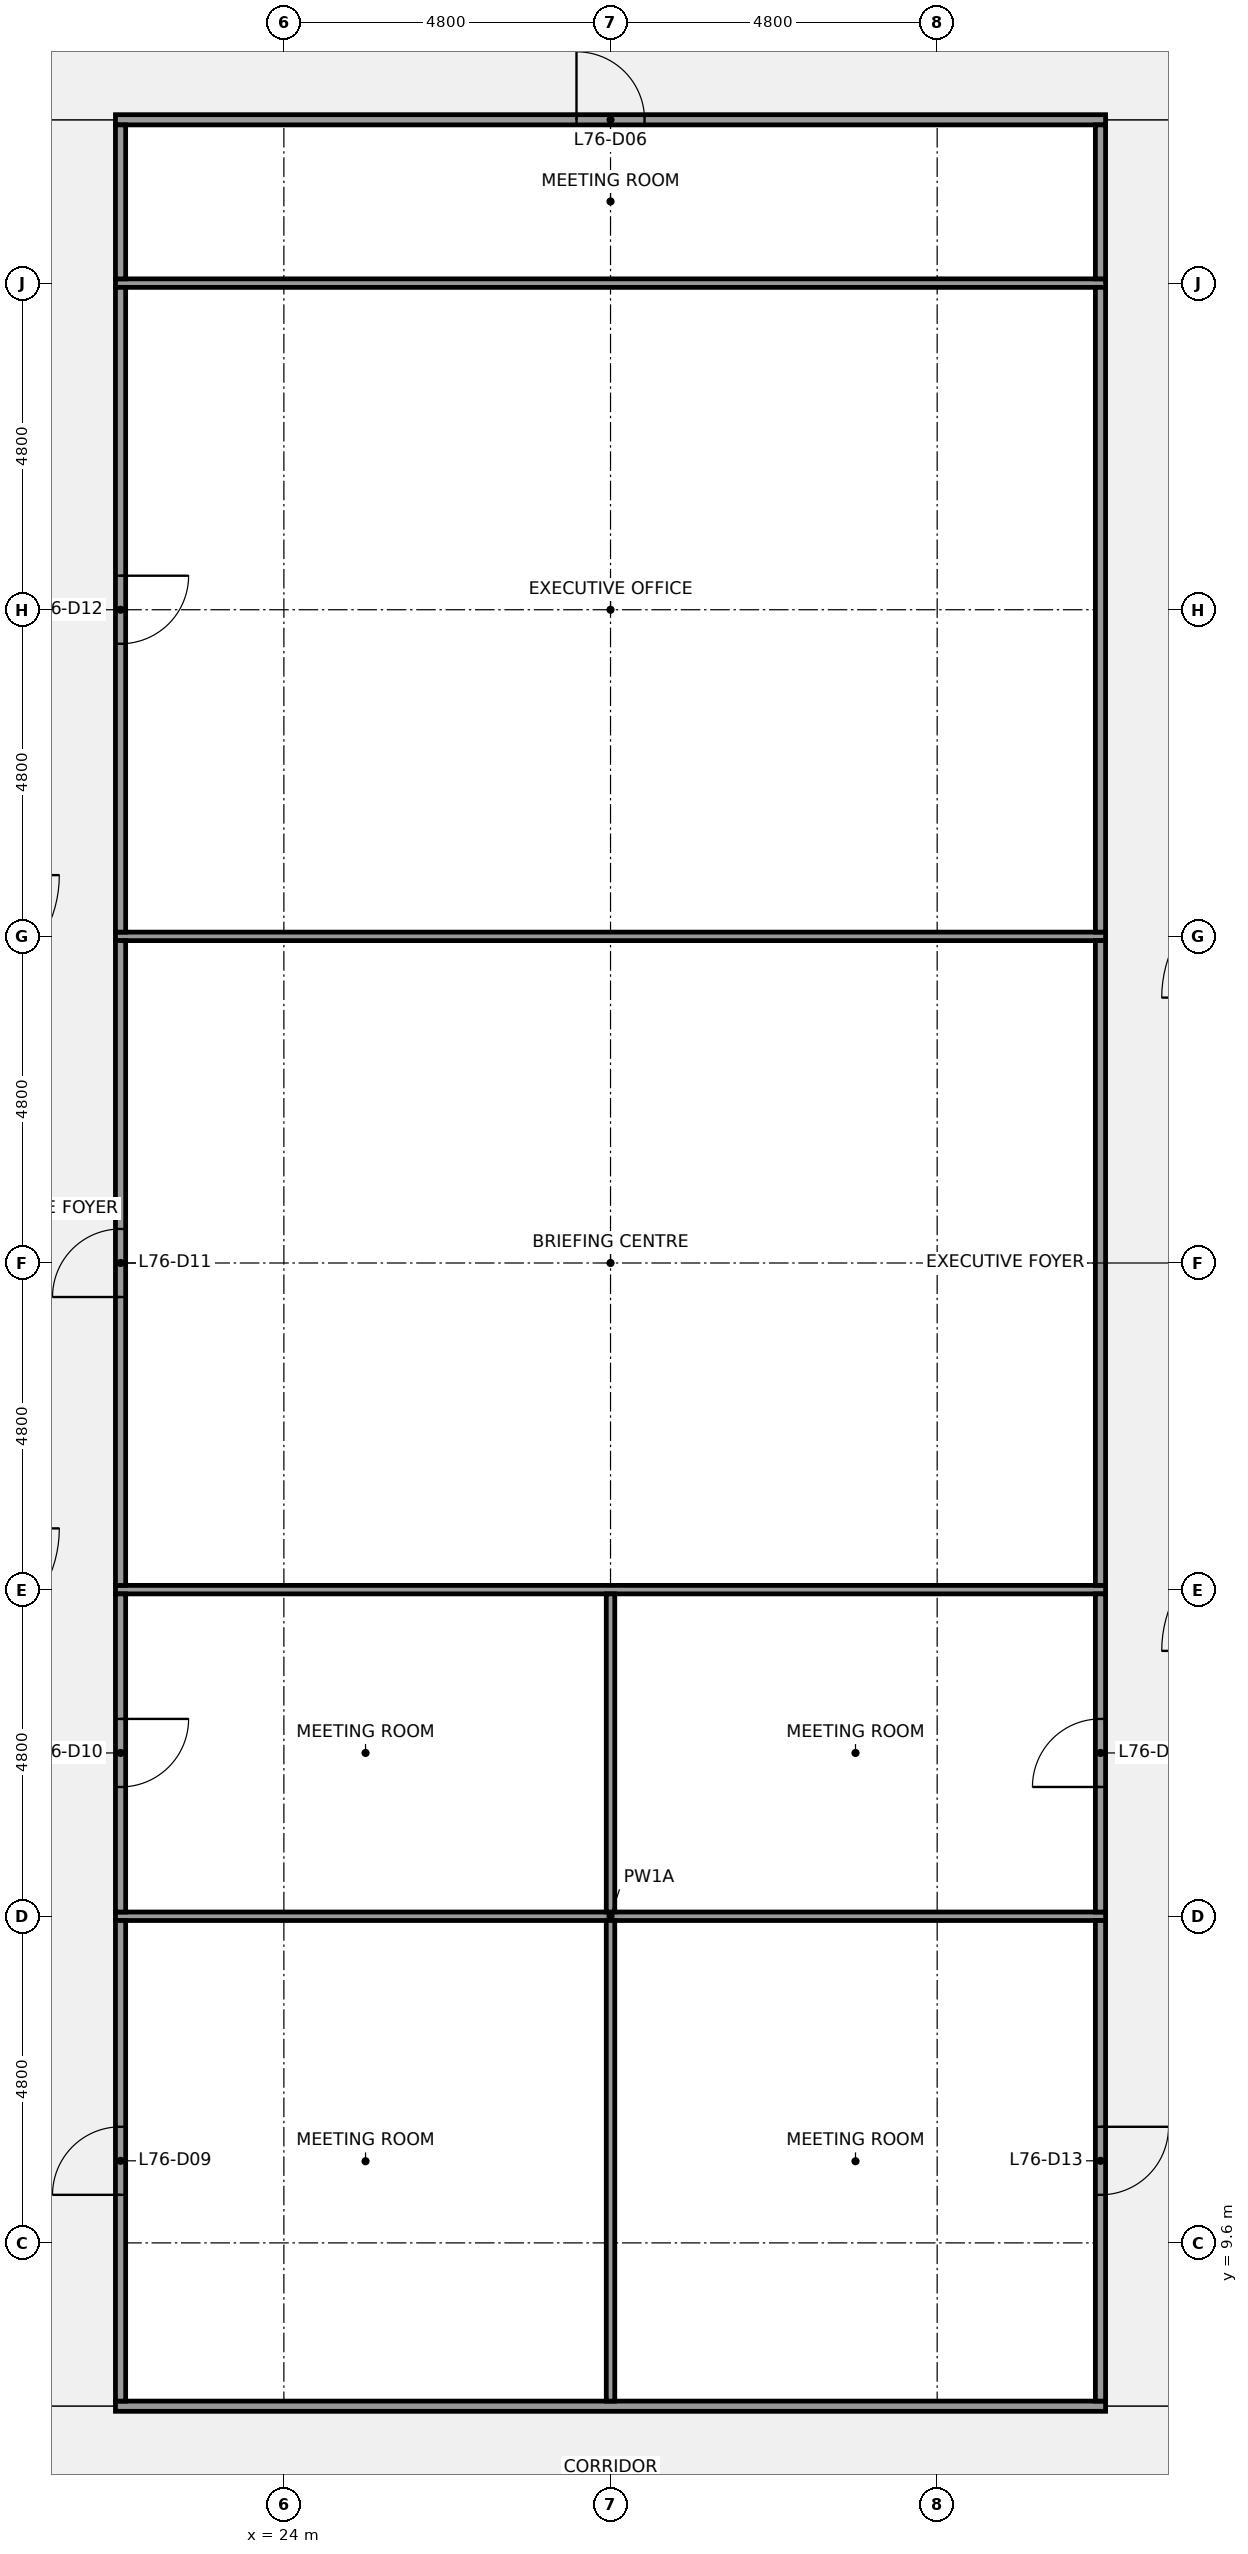
"""IFC4 building model, lengths in metres.
Left out: names, types, materials, properties, quantities, classifications, styles, units other than length and angle.
Written with IfcOpenShell. Run it as: python <this file> out.ifc"""

import sys

from ifc_helpers import new_model, si_unit, direction, frame, frame_2d, origin, place, context, subcontext, project, spatial, rectangle, extrude, element, fill, save


model = new_model("IFC4")
c1 = context("Model", 3, precision=1e-05, world=origin(), true_north=direction((0.0, 1.0)))
c2 = subcontext(c1, "Body", "Model", "MODEL_VIEW")
j1 = project(units=[si_unit("LENGTHUNIT", "METRE"), si_unit("PLANEANGLEUNIT", "RADIAN")], contexts=[c1])
p1 = place(None, origin())
s1 = spatial("IfcSite", under=j1, at=p1, CompositionType="ELEMENT")
p2 = place(p1, origin())
s2 = spatial("IfcBuilding", under=s1, at=p2, CompositionType="ELEMENT")
p3 = place(p2, frame((0.0, 0.0, 342.3)))
s3 = spatial("IfcBuildingStorey", under=s2, at=p3, CompositionType="ELEMENT", Elevation=342.3)
p4 = place(p3, frame((21.525, 7.2, 0.0), z_axis=(0.0, 0.0, 1.0), x_axis=(1.0, 0.0, 0.0)))
e1 = element("IfcWall", 1, at=p4, inside=s3, PredefinedType="PARTITIONING", context=c2, shape_type="SweptSolid", body=[
    extrude(rectangle(XDim=14.55, YDim=0.15, at=frame_2d((7.275, 0.0))), origin(), (0.0, 0.0, 1.0), 2.87),
])
for number, where, z_axis, x_axis in (
    (2, (21.525, 14.4, 0.0), (0.0, 0.0, 1.0), (1.0, 0.0, 0.0)),
    (3, (21.525, 19.2, 0.0), (0.0, 0.0, 1.0), (1.0, 0.0, 0.0)),
    (4, (21.525, 28.8, 0.0), (0.0, 0.0, 1.0), (1.0, 0.0, 0.0)),
    (5, (21.525, 38.4, 0.0), (0.0, 0.0, 1.0), (1.0, 0.0, 0.0)),
):
    element("IfcWall", number, at=place(p3, frame(where, z_axis=z_axis, x_axis=x_axis)), inside=s3, PredefinedType="PARTITIONING", context=c2, shape_type="SweptSolid", body=[
        extrude(rectangle(XDim=14.55, YDim=0.125, at=frame_2d((7.275, 0.0))), origin(), (0.0, 0.0, 1.0), 2.87),
    ])
p5 = place(p3, frame((21.525, 40.8, 0.0), z_axis=(0.0, 0.0, 1.0), x_axis=(1.0, 0.0, 0.0)))
e6 = element("IfcWall", 6, at=p5, inside=s3, PredefinedType="PARTITIONING", context=c2, shape_type="SweptSolid", body=[
    extrude(rectangle(XDim=14.55, YDim=0.15, at=frame_2d((7.275, 0.0))), origin(), (0.0, 0.0, 1.0), 2.87),
])
p6 = place(p5, frame((6.775, 0.0, 0.0)))
e7 = element("IfcOpeningElement", 7, at=p6, cuts=e6, PredefinedType="OPENING", context=c2, shape_type="SweptSolid", body=[
    extrude(rectangle(XDim=1.0, YDim=2.1, at=frame_2d((0.5, 1.05))), frame((0.0, 0.085, 0.0), z_axis=(0.0, -1.0, 0.0), x_axis=(1.0, 0.0, 0.0)), (0.0, 0.0, 1.0), 0.17),
])
p7 = place(p3, frame((21.6, 7.275, 0.0), z_axis=(0.0, 0.0, 1.0), x_axis=(0.0, 1.0, 0.0)))
e8 = element("IfcWall", 8, at=p7, inside=s3, PredefinedType="PARTITIONING", context=c2, shape_type="SweptSolid", body=[
    extrude(rectangle(XDim=7.062, YDim=0.15, at=frame_2d((3.531, 0.0))), origin(), (0.0, 0.0, 1.0), 2.87),
])
p8 = place(p7, frame((3.031, 0.0, 0.0)))
e9 = element("IfcOpeningElement", 9, at=p8, cuts=e8, PredefinedType="OPENING", context=c2, shape_type="SweptSolid", body=[
    extrude(rectangle(XDim=1.0, YDim=2.1, at=frame_2d((0.5, 1.05))), frame((0.0, 0.085, 0.0), z_axis=(0.0, -1.0, 0.0), x_axis=(1.0, 0.0, 0.0)), (0.0, 0.0, 1.0), 0.17),
])
p9 = place(p3, frame((21.6, 14.462, 0.0), z_axis=(0.0, 0.0, 1.0), x_axis=(0.0, 1.0, 0.0)))
e10 = element("IfcWall", 10, at=p9, inside=s3, PredefinedType="PARTITIONING", context=c2, shape_type="SweptSolid", body=[
    extrude(rectangle(XDim=4.675, YDim=0.15, at=frame_2d((2.337, 0.0))), origin(), (0.0, 0.0, 1.0), 2.87),
])
p10 = place(p9, frame((1.837, 0.0, 0.0)))
e11 = element("IfcOpeningElement", 11, at=p10, cuts=e10, PredefinedType="OPENING", context=c2, shape_type="SweptSolid", body=[
    extrude(rectangle(XDim=1.0, YDim=2.1, at=frame_2d((0.5, 1.05))), frame((0.0, 0.085, 0.0), z_axis=(0.0, -1.0, 0.0), x_axis=(1.0, 0.0, 0.0)), (0.0, 0.0, 1.0), 0.17),
])
p11 = place(p3, frame((21.6, 19.262, 0.0), z_axis=(0.0, 0.0, 1.0), x_axis=(0.0, 1.0, 0.0)))
e12 = element("IfcWall", 12, at=p11, inside=s3, PredefinedType="PARTITIONING", context=c2, shape_type="SweptSolid", body=[
    extrude(rectangle(XDim=9.475, YDim=0.15, at=frame_2d((4.738, 0.0))), origin(), (0.0, 0.0, 1.0), 2.87),
])
p12 = place(p11, frame((4.238, 0.0, 0.0)))
e13 = element("IfcOpeningElement", 13, at=p12, cuts=e12, PredefinedType="OPENING", context=c2, shape_type="SweptSolid", body=[
    extrude(rectangle(XDim=1.0, YDim=2.1, at=frame_2d((0.5, 1.05))), frame((0.0, 0.085, 0.0), z_axis=(0.0, -1.0, 0.0), x_axis=(1.0, 0.0, 0.0)), (0.0, 0.0, 1.0), 0.17),
])
p13 = place(p3, frame((21.6, 28.863, 0.0), z_axis=(0.0, 0.0, 1.0), x_axis=(0.0, 1.0, 0.0)))
e14 = element("IfcWall", 14, at=p13, inside=s3, PredefinedType="PARTITIONING", context=c2, shape_type="SweptSolid", body=[
    extrude(rectangle(XDim=9.475, YDim=0.15, at=frame_2d((4.737, 0.0))), origin(), (0.0, 0.0, 1.0), 2.87),
])
p14 = place(p13, frame((4.238, 0.0, 0.0)))
e15 = element("IfcOpeningElement", 15, at=p14, cuts=e14, PredefinedType="OPENING", context=c2, shape_type="SweptSolid", body=[
    extrude(rectangle(XDim=1.0, YDim=2.1, at=frame_2d((0.5, 1.05))), frame((0.0, 0.085, 0.0), z_axis=(0.0, -1.0, 0.0), x_axis=(1.0, 0.0, 0.0)), (0.0, 0.0, 1.0), 0.17),
])
p15 = place(p3, frame((21.6, 38.462, 0.0), z_axis=(0.0, 0.0, 1.0), x_axis=(0.0, 1.0, 0.0)))
e16 = element("IfcWall", 16, at=p15, inside=s3, PredefinedType="PARTITIONING", context=c2, shape_type="SweptSolid", body=[
    extrude(rectangle(XDim=2.263, YDim=0.15, at=frame_2d((1.131, 0.0))), origin(), (0.0, 0.0, 1.0), 2.87),
])
p16 = place(p3, frame((28.8, 7.275, 0.0), z_axis=(0.0, 0.0, 1.0), x_axis=(0.0, 1.0, 0.0)))
e17 = element("IfcWall", 17, at=p16, inside=s3, PredefinedType="PARTITIONING", context=c2, shape_type="SweptSolid", body=[
    extrude(rectangle(XDim=7.062, YDim=0.125, at=frame_2d((3.531, 0.0))), origin(), (0.0, 0.0, 1.0), 2.87),
])
p17 = place(p3, frame((28.8, 14.462, 0.0), z_axis=(0.0, 0.0, 1.0), x_axis=(0.0, 1.0, 0.0)))
e18 = element("IfcWall", 18, at=p17, inside=s3, PredefinedType="PARTITIONING", context=c2, shape_type="SweptSolid", body=[
    extrude(rectangle(XDim=4.675, YDim=0.125, at=frame_2d((2.337, 0.0))), origin(), (0.0, 0.0, 1.0), 2.87),
])
p18 = place(p3, frame((36.0, 7.275, 0.0), z_axis=(0.0, 0.0, 1.0), x_axis=(0.0, 1.0, 0.0)))
e19 = element("IfcWall", 19, at=p18, inside=s3, PredefinedType="PARTITIONING", context=c2, shape_type="SweptSolid", body=[
    extrude(rectangle(XDim=7.062, YDim=0.15, at=frame_2d((3.531, 0.0))), origin(), (0.0, 0.0, 1.0), 2.87),
])
p19 = place(p18, frame((3.031, 0.0, 0.0)))
e20 = element("IfcOpeningElement", 20, at=p19, cuts=e19, PredefinedType="OPENING", context=c2, shape_type="SweptSolid", body=[
    extrude(rectangle(XDim=1.0, YDim=2.1, at=frame_2d((0.5, 1.05))), frame((0.0, 0.085, 0.0), z_axis=(0.0, -1.0, 0.0), x_axis=(1.0, 0.0, 0.0)), (0.0, 0.0, 1.0), 0.17),
])
p20 = place(p3, frame((36.0, 14.462, 0.0), z_axis=(0.0, 0.0, 1.0), x_axis=(0.0, 1.0, 0.0)))
e21 = element("IfcWall", 21, at=p20, inside=s3, PredefinedType="PARTITIONING", context=c2, shape_type="SweptSolid", body=[
    extrude(rectangle(XDim=4.675, YDim=0.15, at=frame_2d((2.337, 0.0))), origin(), (0.0, 0.0, 1.0), 2.87),
])
p21 = place(p20, frame((1.837, 0.0, 0.0)))
e22 = element("IfcOpeningElement", 22, at=p21, cuts=e21, PredefinedType="OPENING", context=c2, shape_type="SweptSolid", body=[
    extrude(rectangle(XDim=1.0, YDim=2.1, at=frame_2d((0.5, 1.05))), frame((0.0, 0.085, 0.0), z_axis=(0.0, -1.0, 0.0), x_axis=(1.0, 0.0, 0.0)), (0.0, 0.0, 1.0), 0.17),
])
p22 = place(p3, frame((36.0, 19.262, 0.0), z_axis=(0.0, 0.0, 1.0), x_axis=(0.0, 1.0, 0.0)))
e23 = element("IfcWall", 23, at=p22, inside=s3, PredefinedType="PARTITIONING", context=c2, shape_type="SweptSolid", body=[
    extrude(rectangle(XDim=9.475, YDim=0.15, at=frame_2d((4.738, 0.0))), origin(), (0.0, 0.0, 1.0), 2.87),
])
p23 = place(p3, frame((36.0, 28.863, 0.0), z_axis=(0.0, 0.0, 1.0), x_axis=(0.0, 1.0, 0.0)))
e24 = element("IfcWall", 24, at=p23, inside=s3, PredefinedType="PARTITIONING", context=c2, shape_type="SweptSolid", body=[
    extrude(rectangle(XDim=9.475, YDim=0.15, at=frame_2d((4.737, 0.0))), origin(), (0.0, 0.0, 1.0), 2.87),
])
p24 = place(p3, frame((36.0, 38.462, 0.0), z_axis=(0.0, 0.0, 1.0), x_axis=(0.0, 1.0, 0.0)))
e25 = element("IfcWall", 25, at=p24, inside=s3, PredefinedType="PARTITIONING", context=c2, shape_type="SweptSolid", body=[
    extrude(rectangle(XDim=2.263, YDim=0.15, at=frame_2d((1.131, 0.0))), origin(), (0.0, 0.0, 1.0), 2.87),
])
p25 = place(p6, origin())
e26 = element("IfcDoor", 26, at=p25, inside=s3, OperationType="SINGLE_SWING_LEFT", PredefinedType="DOOR", context=c2, shape_type="SweptSolid", body=[
    extrude(rectangle(XDim=1.0, YDim=2.1, at=frame_2d((0.5, 1.05))), frame((0.0, 0.025, 0.0), z_axis=(0.0, -1.0, 0.0), x_axis=(1.0, 0.0, 0.0)), (0.0, 0.0, 1.0), 0.05),
])
fill(e7, e26)
p26 = place(p8, origin())
e27 = element("IfcDoor", 27, at=p26, inside=s3, OperationType="SINGLE_SWING_LEFT", PredefinedType="DOOR", context=c2, shape_type="SweptSolid", body=[
    extrude(rectangle(XDim=1.0, YDim=2.1, at=frame_2d((0.5, 1.05))), frame((0.0, 0.025, 0.0), z_axis=(0.0, -1.0, 0.0), x_axis=(1.0, 0.0, 0.0)), (0.0, 0.0, 1.0), 0.05),
])
fill(e9, e27)
p27 = place(p10, origin())
e28 = element("IfcDoor", 28, at=p27, inside=s3, OperationType="SINGLE_SWING_RIGHT", PredefinedType="DOOR", context=c2, shape_type="SweptSolid", body=[
    extrude(rectangle(XDim=1.0, YDim=2.1, at=frame_2d((0.5, 1.05))), frame((0.0, 0.025, 0.0), z_axis=(0.0, -1.0, 0.0), x_axis=(1.0, 0.0, 0.0)), (0.0, 0.0, 1.0), 0.05),
])
fill(e11, e28)
p28 = place(p12, origin())
e29 = element("IfcDoor", 29, at=p28, inside=s3, OperationType="SINGLE_SWING_LEFT", PredefinedType="DOOR", context=c2, shape_type="SweptSolid", body=[
    extrude(rectangle(XDim=1.0, YDim=2.1, at=frame_2d((0.5, 1.05))), frame((0.0, 0.025, 0.0), z_axis=(0.0, -1.0, 0.0), x_axis=(1.0, 0.0, 0.0)), (0.0, 0.0, 1.0), 0.05),
])
fill(e13, e29)
p29 = place(p14, origin())
e30 = element("IfcDoor", 30, at=p29, inside=s3, OperationType="SINGLE_SWING_RIGHT", PredefinedType="DOOR", context=c2, shape_type="SweptSolid", body=[
    extrude(rectangle(XDim=1.0, YDim=2.1, at=frame_2d((0.5, 1.05))), frame((0.0, 0.025, 0.0), z_axis=(0.0, -1.0, 0.0), x_axis=(1.0, 0.0, 0.0)), (0.0, 0.0, 1.0), 0.05),
])
fill(e15, e30)
p30 = place(p19, origin())
e31 = element("IfcDoor", 31, at=p30, inside=s3, OperationType="SINGLE_SWING_RIGHT", PredefinedType="DOOR", context=c2, shape_type="SweptSolid", body=[
    extrude(rectangle(XDim=1.0, YDim=2.1, at=frame_2d((0.5, 1.05))), frame((0.0, 0.025, 0.0), z_axis=(0.0, -1.0, 0.0), x_axis=(1.0, 0.0, 0.0)), (0.0, 0.0, 1.0), 0.05),
])
fill(e20, e31)
p31 = place(p21, origin())
e32 = element("IfcDoor", 32, at=p31, inside=s3, OperationType="SINGLE_SWING_LEFT", PredefinedType="DOOR", context=c2, shape_type="SweptSolid", body=[
    extrude(rectangle(XDim=1.0, YDim=2.1, at=frame_2d((0.5, 1.05))), frame((0.0, 0.025, 0.0), z_axis=(0.0, -1.0, 0.0), x_axis=(1.0, 0.0, 0.0)), (0.0, 0.0, 1.0), 0.05),
])
fill(e22, e32)
save(model, sys.argv[1])
